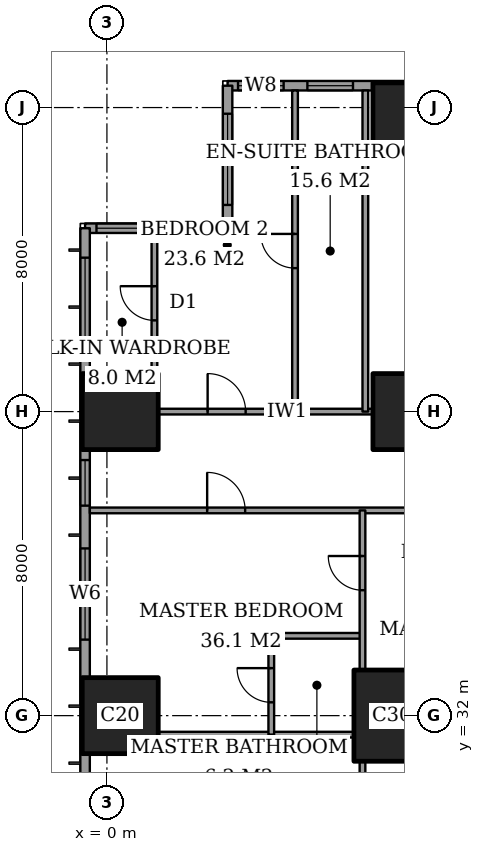
"""IFC4 building model, lengths in metres.
Left out: names, types, materials, properties, quantities, classifications, styles, units other than length and angle.
Written with IfcOpenShell. Run it as: python <this file> out.ifc"""

import sys

from ifc_helpers import new_model, si_unit, direction, frame, frame_2d, origin, origin_2d, place, context, subcontext, project, spatial, rectangle, extrude, element, fill, save


model = new_model("IFC4")
c1 = context("Model", 3, precision=1e-05, world=origin(), true_north=direction((0.0, 1.0)))
c2 = subcontext(c1, "Body", "Model", "MODEL_VIEW")
j1 = project(units=[si_unit("LENGTHUNIT", "METRE"), si_unit("PLANEANGLEUNIT", "RADIAN")], contexts=[c1])
p1 = place(None, origin())
s1 = spatial("IfcSite", under=j1, at=p1, CompositionType="ELEMENT")
p2 = place(p1, origin())
s2 = spatial("IfcBuilding", under=s1, at=p2, CompositionType="ELEMENT")
p3 = place(p2, frame((0.0, 0.0, 58.4)))
s3 = spatial("IfcBuildingStorey", under=s2, at=p3, CompositionType="ELEMENT", Elevation=58.4)
for number, where, z_axis, x_axis in (
    (1, (0.35, 32.0, 0.0), (0.0, 0.0, 1.0), (1.0, 0.0, 0.0)),
    (2, (0.35, 40.0, 0.0), (0.0, 0.0, 1.0), (1.0, 0.0, 0.0)),
):
    element("IfcColumn", number, at=place(p3, frame(where, z_axis=z_axis, x_axis=x_axis)), inside=s3, PredefinedType="COLUMN", context=c2, shape_type="SweptSolid", body=[
        extrude(rectangle(XDim=2.0, YDim=2.0, at=origin_2d()), origin(), (0.0, 0.0, 1.0), 3.6),
    ])
p4 = place(p3, frame((8.0, 32.0, 0.0), z_axis=(0.0, 0.0, 1.0), x_axis=(1.0, 0.0, 0.0)))
e3 = element("IfcColumn", 3, at=p4, inside=s3, PredefinedType="COLUMN", context=c2, shape_type="SweptSolid", body=[
    extrude(rectangle(XDim=3.0, YDim=2.4, at=origin_2d()), origin(), (0.0, 0.0, 1.0), 3.6),
])
for number, where, z_axis, x_axis in (
    (4, (8.0, 40.0, 0.0), (0.0, 0.0, 1.0), (1.0, 0.0, 0.0)),
    (5, (8.0, 47.65, 0.0), (0.0, 0.0, 1.0), (1.0, 0.0, 0.0)),
):
    element("IfcColumn", number, at=place(p3, frame(where, z_axis=z_axis, x_axis=x_axis)), inside=s3, PredefinedType="COLUMN", context=c2, shape_type="SweptSolid", body=[
        extrude(rectangle(XDim=2.0, YDim=2.0, at=origin_2d()), origin(), (0.0, 0.0, 1.0), 3.6),
    ])
p5 = place(p3, frame((24.575, 48.575, 0.0), z_axis=(0.0, 0.0, 1.0), x_axis=(-1.0, 0.0, 0.0)))
e6 = element("IfcWall", 6, at=p5, inside=s3, PredefinedType="SOLIDWALL", context=c2, shape_type="SweptSolid", body=[
    extrude(rectangle(XDim=21.4, YDim=0.25, at=frame_2d((10.7, 0.0))), origin(), (0.0, 0.0, 1.0), 3.6),
])
p6 = place(p5, frame((2.65, 0.0, 0.6)))
e7 = element("IfcOpeningElement", 7, at=p6, cuts=e6, PredefinedType="OPENING", context=c2, shape_type="SweptSolid", body=[
    extrude(rectangle(XDim=1.2, YDim=2.0, at=frame_2d((0.6, 1.0))), frame((0.0, 0.135, 0.0), z_axis=(0.0, -1.0, 0.0), x_axis=(1.0, 0.0, 0.0)), (0.0, 0.0, 1.0), 0.27),
])
p7 = place(p5, frame((5.475, 0.0, 0.6)))
e8 = element("IfcOpeningElement", 8, at=p7, cuts=e6, PredefinedType="OPENING", context=c2, shape_type="SweptSolid", body=[
    extrude(rectangle(XDim=1.2, YDim=2.0, at=frame_2d((0.6, 1.0))), frame((0.0, 0.135, 0.0), z_axis=(0.0, -1.0, 0.0), x_axis=(1.0, 0.0, 0.0)), (0.0, 0.0, 1.0), 0.27),
])
p8 = place(p5, frame((11.375, 0.0, 0.6)))
e9 = element("IfcOpeningElement", 9, at=p8, cuts=e6, PredefinedType="OPENING", context=c2, shape_type="SweptSolid", body=[
    extrude(rectangle(XDim=2.4, YDim=2.0, at=frame_2d((1.2, 1.0))), frame((0.0, 0.135, 0.0), z_axis=(0.0, -1.0, 0.0), x_axis=(1.0, 0.0, 0.0)), (0.0, 0.0, 1.0), 0.27),
])
p9 = place(p5, frame((18.1, 0.0, 0.6)))
e10 = element("IfcOpeningElement", 10, at=p9, cuts=e6, PredefinedType="OPENING", context=c2, shape_type="SweptSolid", body=[
    extrude(rectangle(XDim=1.2, YDim=2.0, at=frame_2d((0.6, 1.0))), frame((0.0, 0.135, 0.0), z_axis=(0.0, -1.0, 0.0), x_axis=(1.0, 0.0, 0.0)), (0.0, 0.0, 1.0), 0.27),
])
p10 = place(p5, frame((19.925, 0.0, 0.6)))
e11 = element("IfcOpeningElement", 11, at=p10, cuts=e6, PredefinedType="OPENING", context=c2, shape_type="SweptSolid", body=[
    extrude(rectangle(XDim=1.2, YDim=2.0, at=frame_2d((0.6, 1.0))), frame((0.0, 0.135, 0.0), z_axis=(0.0, -1.0, 0.0), x_axis=(1.0, 0.0, 0.0)), (0.0, 0.0, 1.0), 0.27),
])
p11 = place(p3, frame((3.175, 48.575, 0.0), z_axis=(0.0, 0.0, 1.0), x_axis=(0.0, -1.0, 0.0)))
e12 = element("IfcWall", 12, at=p11, inside=s3, PredefinedType="SOLIDWALL", context=c2, shape_type="SweptSolid", body=[
    extrude(rectangle(XDim=3.75, YDim=0.25, at=frame_2d((1.875, 0.0))), origin(), (0.0, 0.0, 1.0), 3.6),
])
p12 = place(p11, frame((0.738, 0.0, 0.6)))
e13 = element("IfcOpeningElement", 13, at=p12, cuts=e12, PredefinedType="OPENING", context=c2, shape_type="SweptSolid", body=[
    extrude(rectangle(XDim=2.4, YDim=2.0, at=frame_2d((1.2, 1.0))), frame((0.0, 0.135, 0.0), z_axis=(0.0, -1.0, 0.0), x_axis=(1.0, 0.0, 0.0)), (0.0, 0.0, 1.0), 0.27),
])
p13 = place(p3, frame((3.175, 44.825, 0.0), z_axis=(0.0, 0.0, 1.0), x_axis=(-1.0, 0.0, 0.0)))
e14 = element("IfcWall", 14, at=p13, inside=s3, PredefinedType="SOLIDWALL", context=c2, shape_type="SweptSolid", body=[
    extrude(rectangle(XDim=3.75, YDim=0.25, at=frame_2d((1.875, 0.0))), origin(), (0.0, 0.0, 1.0), 3.6),
])
p14 = place(p13, frame((0.363, 0.0, 0.6)))
e15 = element("IfcOpeningElement", 15, at=p14, cuts=e14, PredefinedType="OPENING", context=c2, shape_type="SweptSolid", body=[
    extrude(rectangle(XDim=1.2, YDim=2.0, at=frame_2d((0.6, 1.0))), frame((0.0, 0.135, 0.0), z_axis=(0.0, -1.0, 0.0), x_axis=(1.0, 0.0, 0.0)), (0.0, 0.0, 1.0), 0.27),
])
p15 = place(p13, frame((2.25, 0.0, 0.6)))
e16 = element("IfcOpeningElement", 16, at=p15, cuts=e14, PredefinedType="OPENING", context=c2, shape_type="SweptSolid", body=[
    extrude(rectangle(XDim=1.2, YDim=2.0, at=frame_2d((0.6, 1.0))), frame((0.0, 0.135, 0.0), z_axis=(0.0, -1.0, 0.0), x_axis=(1.0, 0.0, 0.0)), (0.0, 0.0, 1.0), 0.27),
])
p16 = place(p3, frame((-0.575, 44.825, 0.0), z_axis=(0.0, 0.0, 1.0), x_axis=(0.0, -1.0, 0.0)))
e17 = element("IfcWall", 17, at=p16, inside=s3, PredefinedType="SOLIDWALL", context=c2, shape_type="SweptSolid", body=[
    extrude(rectangle(XDim=41.65, YDim=0.25, at=frame_2d((20.825, 0.0))), origin(), (0.0, 0.0, 1.0), 3.6),
])
p17 = place(p16, frame((0.775, 0.0, 0.6)))
e18 = element("IfcOpeningElement", 18, at=p17, cuts=e17, PredefinedType="OPENING", context=c2, shape_type="SweptSolid", body=[
    extrude(rectangle(XDim=2.4, YDim=2.0, at=frame_2d((1.2, 1.0))), frame((0.0, 0.135, 0.0), z_axis=(0.0, -1.0, 0.0), x_axis=(1.0, 0.0, 0.0)), (0.0, 0.0, 1.0), 0.27),
])
p18 = place(p16, frame((6.1, 0.0, 0.6)))
e19 = element("IfcOpeningElement", 19, at=p18, cuts=e17, PredefinedType="OPENING", context=c2, shape_type="SweptSolid", body=[
    extrude(rectangle(XDim=1.2, YDim=2.0, at=frame_2d((0.6, 1.0))), frame((0.0, 0.135, 0.0), z_axis=(0.0, -1.0, 0.0), x_axis=(1.0, 0.0, 0.0)), (0.0, 0.0, 1.0), 0.27),
])
p19 = place(p16, frame((8.425, 0.0, 0.6)))
e20 = element("IfcOpeningElement", 20, at=p19, cuts=e17, PredefinedType="OPENING", context=c2, shape_type="SweptSolid", body=[
    extrude(rectangle(XDim=2.4, YDim=2.0, at=frame_2d((1.2, 1.0))), frame((0.0, 0.135, 0.0), z_axis=(0.0, -1.0, 0.0), x_axis=(1.0, 0.0, 0.0)), (0.0, 0.0, 1.0), 0.27),
])
p20 = place(p16, frame((15.625, 0.0, 0.6)))
e21 = element("IfcOpeningElement", 21, at=p20, cuts=e17, PredefinedType="OPENING", context=c2, shape_type="SweptSolid", body=[
    extrude(rectangle(XDim=2.4, YDim=2.0, at=frame_2d((1.2, 1.0))), frame((0.0, 0.135, 0.0), z_axis=(0.0, -1.0, 0.0), x_axis=(1.0, 0.0, 0.0)), (0.0, 0.0, 1.0), 0.27),
])
p21 = place(p16, frame((23.625, 0.0, 0.6)))
e22 = element("IfcOpeningElement", 22, at=p21, cuts=e17, PredefinedType="OPENING", context=c2, shape_type="SweptSolid", body=[
    extrude(rectangle(XDim=2.4, YDim=2.0, at=frame_2d((1.2, 1.0))), frame((0.0, 0.135, 0.0), z_axis=(0.0, -1.0, 0.0), x_axis=(1.0, 0.0, 0.0)), (0.0, 0.0, 1.0), 0.27),
])
p22 = place(p16, frame((30.825, 0.0, 0.6)))
e23 = element("IfcOpeningElement", 23, at=p22, cuts=e17, PredefinedType="OPENING", context=c2, shape_type="SweptSolid", body=[
    extrude(rectangle(XDim=2.4, YDim=2.0, at=frame_2d((1.2, 1.0))), frame((0.0, 0.135, 0.0), z_axis=(0.0, -1.0, 0.0), x_axis=(1.0, 0.0, 0.0)), (0.0, 0.0, 1.0), 0.27),
])
p23 = place(p16, frame((34.5, 0.0, 0.6)))
e24 = element("IfcOpeningElement", 24, at=p23, cuts=e17, PredefinedType="OPENING", context=c2, shape_type="SweptSolid", body=[
    extrude(rectangle(XDim=1.2, YDim=2.0, at=frame_2d((0.6, 1.0))), frame((0.0, 0.135, 0.0), z_axis=(0.0, -1.0, 0.0), x_axis=(1.0, 0.0, 0.0)), (0.0, 0.0, 1.0), 0.27),
])
p24 = place(p16, frame((38.475, 0.0, 0.6)))
e25 = element("IfcOpeningElement", 25, at=p24, cuts=e17, PredefinedType="OPENING", context=c2, shape_type="SweptSolid", body=[
    extrude(rectangle(XDim=2.4, YDim=2.0, at=frame_2d((1.2, 1.0))), frame((0.0, 0.135, 0.0), z_axis=(0.0, -1.0, 0.0), x_axis=(1.0, 0.0, 0.0)), (0.0, 0.0, 1.0), 0.27),
])
p25 = place(p3, frame((1.35, 31.5, 0.0), z_axis=(0.0, 0.0, 1.0), x_axis=(1.0, 0.0, 0.0)))
e26 = element("IfcWall", 26, at=p25, inside=s3, PredefinedType="PARTITIONING", context=c2, shape_type="SweptSolid", body=[
    extrude(rectangle(XDim=5.15, YDim=0.15, at=frame_2d((2.575, 0.0))), origin(), (0.0, 0.0, 1.0), 3.35),
])
p26 = place(p3, frame((4.325, 34.1, 0.0), z_axis=(0.0, 0.0, 1.0), x_axis=(1.0, 0.0, 0.0)))
e27 = element("IfcWall", 27, at=p26, inside=s3, PredefinedType="PARTITIONING", context=c2, shape_type="SweptSolid", body=[
    extrude(rectangle(XDim=2.4, YDim=0.15, at=frame_2d((1.2, 0.0))), origin(), (0.0, 0.0, 1.0), 3.35),
])
p27 = place(p3, frame((-0.45, 37.4, 0.0), z_axis=(0.0, 0.0, 1.0), x_axis=(1.0, 0.0, 0.0)))
e28 = element("IfcWall", 28, at=p27, inside=s3, PredefinedType="PARTITIONING", context=c2, shape_type="SweptSolid", body=[
    extrude(rectangle(XDim=25.011, YDim=0.15, at=frame_2d((12.505, 0.0))), origin(), (0.0, 0.0, 1.0), 3.35),
])
p28 = place(p27, frame((10.65, 0.0, 0.0)))
e29 = element("IfcOpeningElement", 29, at=p28, cuts=e28, PredefinedType="OPENING", context=c2, shape_type="SweptSolid", body=[
    extrude(rectangle(XDim=1.0, YDim=2.1, at=frame_2d((0.5, 1.05))), frame((0.0, 0.085, 0.0), z_axis=(0.0, -1.0, 0.0), x_axis=(1.0, 0.0, 0.0)), (0.0, 0.0, 1.0), 0.17),
])
p29 = place(p27, frame((3.087, 0.0, 0.0)))
e30 = element("IfcOpeningElement", 30, at=p29, cuts=e28, PredefinedType="OPENING", context=c2, shape_type="SweptSolid", body=[
    extrude(rectangle(XDim=1.0, YDim=2.1, at=frame_2d((0.5, 1.05))), frame((0.0, 0.085, 0.0), z_axis=(0.0, -1.0, 0.0), x_axis=(1.0, 0.0, 0.0)), (0.0, 0.0, 1.0), 0.17),
])
p30 = place(p27, frame((13.45, 0.0, 0.0)))
e31 = element("IfcOpeningElement", 31, at=p30, cuts=e28, PredefinedType="OPENING", context=c2, shape_type="SweptSolid", body=[
    extrude(rectangle(XDim=1.0, YDim=2.1, at=frame_2d((0.5, 1.05))), frame((0.0, 0.085, 0.0), z_axis=(0.0, -1.0, 0.0), x_axis=(1.0, 0.0, 0.0)), (0.0, 0.0, 1.0), 0.17),
])
p31 = place(p27, frame((16.55, 0.0, 0.0)))
e32 = element("IfcOpeningElement", 32, at=p31, cuts=e28, PredefinedType="OPENING", context=c2, shape_type="SweptSolid", body=[
    extrude(rectangle(XDim=1.0, YDim=2.1, at=frame_2d((0.5, 1.05))), frame((0.0, 0.085, 0.0), z_axis=(0.0, -1.0, 0.0), x_axis=(1.0, 0.0, 0.0)), (0.0, 0.0, 1.0), 0.17),
])
p32 = place(p27, frame((21.175, 0.0, 0.0)))
e33 = element("IfcOpeningElement", 33, at=p32, cuts=e28, PredefinedType="OPENING", context=c2, shape_type="SweptSolid", body=[
    extrude(rectangle(XDim=1.0, YDim=2.1, at=frame_2d((0.5, 1.05))), frame((0.0, 0.085, 0.0), z_axis=(0.0, -1.0, 0.0), x_axis=(1.0, 0.0, 0.0)), (0.0, 0.0, 1.0), 0.17),
])
p33 = place(p3, frame((1.35, 40.0, 0.0), z_axis=(0.0, 0.0, 1.0), x_axis=(1.0, 0.0, 0.0)))
e34 = element("IfcWall", 34, at=p33, inside=s3, PredefinedType="PARTITIONING", context=c2, shape_type="SweptSolid", body=[
    extrude(rectangle(XDim=5.65, YDim=0.15, at=frame_2d((2.825, 0.0))), origin(), (0.0, 0.0, 1.0), 3.35),
])
p34 = place(p33, frame((1.3, 0.0, 0.0)))
e35 = element("IfcOpeningElement", 35, at=p34, cuts=e34, PredefinedType="OPENING", context=c2, shape_type="SweptSolid", body=[
    extrude(rectangle(XDim=1.0, YDim=2.1, at=frame_2d((0.5, 1.05))), frame((0.0, 0.085, 0.0), z_axis=(0.0, -1.0, 0.0), x_axis=(1.0, 0.0, 0.0)), (0.0, 0.0, 1.0), 0.17),
])
p35 = place(p3, frame((1.25, 41.0, 0.0), z_axis=(0.0, 0.0, 1.0), x_axis=(0.0, 1.0, 0.0)))
e36 = element("IfcWall", 36, at=p35, inside=s3, PredefinedType="PARTITIONING", context=c2, shape_type="SweptSolid", body=[
    extrude(rectangle(XDim=3.7, YDim=0.15, at=frame_2d((1.85, 0.0))), origin(), (0.0, 0.0, 1.0), 3.35),
])
p36 = place(p35, frame((1.4, 0.0, 0.0)))
e37 = element("IfcOpeningElement", 37, at=p36, cuts=e36, PredefinedType="OPENING", context=c2, shape_type="SweptSolid", body=[
    extrude(rectangle(XDim=0.9, YDim=2.1, at=frame_2d((0.45, 1.05))), frame((0.0, 0.085, 0.0), z_axis=(0.0, -1.0, 0.0), x_axis=(1.0, 0.0, 0.0)), (0.0, 0.0, 1.0), 0.17),
])
p37 = place(p3, frame((4.325, 31.5, 0.0), z_axis=(0.0, 0.0, 1.0), x_axis=(0.0, 1.0, 0.0)))
e38 = element("IfcWall", 38, at=p37, inside=s3, PredefinedType="PARTITIONING", context=c2, shape_type="SweptSolid", body=[
    extrude(rectangle(XDim=2.6, YDim=0.15, at=frame_2d((1.3, 0.0))), origin(), (0.0, 0.0, 1.0), 3.35),
])
p38 = place(p37, frame((0.85, 0.0, 0.0)))
e39 = element("IfcOpeningElement", 39, at=p38, cuts=e38, PredefinedType="OPENING", context=c2, shape_type="SweptSolid", body=[
    extrude(rectangle(XDim=0.9, YDim=2.1, at=frame_2d((0.45, 1.05))), frame((0.0, 0.085, 0.0), z_axis=(0.0, -1.0, 0.0), x_axis=(1.0, 0.0, 0.0)), (0.0, 0.0, 1.0), 0.17),
])
p39 = place(p3, frame((4.95, 40.0, 0.0), z_axis=(0.0, 0.0, 1.0), x_axis=(0.0, 1.0, 0.0)))
e40 = element("IfcWall", 40, at=p39, inside=s3, PredefinedType="PARTITIONING", context=c2, shape_type="SweptSolid", body=[
    extrude(rectangle(XDim=8.45, YDim=0.15, at=frame_2d((4.225, 0.0))), origin(), (0.0, 0.0, 1.0), 3.35),
])
p40 = place(p39, frame((3.775, 0.0, 0.0)))
e41 = element("IfcOpeningElement", 41, at=p40, cuts=e40, PredefinedType="OPENING", context=c2, shape_type="SweptSolid", body=[
    extrude(rectangle(XDim=0.9, YDim=2.1, at=frame_2d((0.45, 1.05))), frame((0.0, 0.085, 0.0), z_axis=(0.0, -1.0, 0.0), x_axis=(1.0, 0.0, 0.0)), (0.0, 0.0, 1.0), 0.17),
])
p41 = place(p3, frame((6.725, 28.35, 0.0), z_axis=(0.0, 0.0, 1.0), x_axis=(0.0, 1.0, 0.0)))
e42 = element("IfcWall", 42, at=p41, inside=s3, PredefinedType="PARTITIONING", context=c2, shape_type="SweptSolid", body=[
    extrude(rectangle(XDim=2.45, YDim=0.15, at=frame_2d((1.225, 0.0))), origin(), (0.0, 0.0, 1.0), 3.35),
])
p42 = place(p41, frame((0.913, 0.0, 0.0)))
e43 = element("IfcOpeningElement", 43, at=p42, cuts=e42, PredefinedType="OPENING", context=c2, shape_type="SweptSolid", body=[
    extrude(rectangle(XDim=1.0, YDim=2.1, at=frame_2d((0.5, 1.05))), frame((0.0, 0.085, 0.0), z_axis=(0.0, -1.0, 0.0), x_axis=(1.0, 0.0, 0.0)), (0.0, 0.0, 1.0), 0.17),
])
p43 = place(p3, frame((6.725, 33.2, 0.0), z_axis=(0.0, 0.0, 1.0), x_axis=(0.0, 1.0, 0.0)))
e44 = element("IfcWall", 44, at=p43, inside=s3, PredefinedType="PARTITIONING", context=c2, shape_type="SweptSolid", body=[
    extrude(rectangle(XDim=4.2, YDim=0.15, at=frame_2d((2.1, 0.0))), origin(), (0.0, 0.0, 1.0), 3.35),
])
p44 = place(p43, frame((2.1, 0.0, 0.0)))
e45 = element("IfcOpeningElement", 45, at=p44, cuts=e44, PredefinedType="OPENING", context=c2, shape_type="SweptSolid", body=[
    extrude(rectangle(XDim=0.9, YDim=2.1, at=frame_2d((0.45, 1.05))), frame((0.0, 0.085, 0.0), z_axis=(0.0, -1.0, 0.0), x_axis=(1.0, 0.0, 0.0)), (0.0, 0.0, 1.0), 0.17),
])
p45 = place(p3, frame((6.8, 40.0, 0.0), z_axis=(0.0, 0.0, 1.0), x_axis=(0.0, 1.0, 0.0)))
e46 = element("IfcWall", 46, at=p45, inside=s3, PredefinedType="PARTITIONING", context=c2, shape_type="SweptSolid", body=[
    extrude(rectangle(XDim=8.45, YDim=0.15, at=frame_2d((4.225, 0.0))), origin(), (0.0, 0.0, 1.0), 3.35),
])
p46 = place(p9, origin())
e47 = element("IfcWindow", 47, at=p46, inside=s3, PartitioningType="SINGLE_PANEL", PredefinedType="WINDOW", context=c2, shape_type="SweptSolid", body=[
    extrude(rectangle(XDim=1.2, YDim=2.0, at=frame_2d((0.6, 1.0))), frame((0.0, 0.03, 0.0), z_axis=(0.0, -1.0, 0.0), x_axis=(1.0, 0.0, 0.0)), (0.0, 0.0, 1.0), 0.06),
])
fill(e10, e47)
p47 = place(p10, origin())
e48 = element("IfcWindow", 48, at=p47, inside=s3, PartitioningType="SINGLE_PANEL", PredefinedType="WINDOW", context=c2, shape_type="SweptSolid", body=[
    extrude(rectangle(XDim=1.2, YDim=2.0, at=frame_2d((0.6, 1.0))), frame((0.0, 0.03, 0.0), z_axis=(0.0, -1.0, 0.0), x_axis=(1.0, 0.0, 0.0)), (0.0, 0.0, 1.0), 0.06),
])
fill(e11, e48)
p48 = place(p12, origin())
e49 = element("IfcWindow", 49, at=p48, inside=s3, PartitioningType="SINGLE_PANEL", PredefinedType="WINDOW", context=c2, shape_type="SweptSolid", body=[
    extrude(rectangle(XDim=2.4, YDim=2.0, at=frame_2d((1.2, 1.0))), frame((0.0, 0.03, 0.0), z_axis=(0.0, -1.0, 0.0), x_axis=(1.0, 0.0, 0.0)), (0.0, 0.0, 1.0), 0.06),
])
fill(e13, e49)
p49 = place(p14, origin())
e50 = element("IfcWindow", 50, at=p49, inside=s3, PartitioningType="SINGLE_PANEL", PredefinedType="WINDOW", context=c2, shape_type="SweptSolid", body=[
    extrude(rectangle(XDim=1.2, YDim=2.0, at=frame_2d((0.6, 1.0))), frame((0.0, 0.03, 0.0), z_axis=(0.0, -1.0, 0.0), x_axis=(1.0, 0.0, 0.0)), (0.0, 0.0, 1.0), 0.06),
])
fill(e15, e50)
p50 = place(p15, origin())
e51 = element("IfcWindow", 51, at=p50, inside=s3, PartitioningType="SINGLE_PANEL", PredefinedType="WINDOW", context=c2, shape_type="SweptSolid", body=[
    extrude(rectangle(XDim=1.2, YDim=2.0, at=frame_2d((0.6, 1.0))), frame((0.0, 0.03, 0.0), z_axis=(0.0, -1.0, 0.0), x_axis=(1.0, 0.0, 0.0)), (0.0, 0.0, 1.0), 0.06),
])
fill(e16, e51)
p51 = place(p17, origin())
e52 = element("IfcWindow", 52, at=p51, inside=s3, PartitioningType="SINGLE_PANEL", PredefinedType="WINDOW", context=c2, shape_type="SweptSolid", body=[
    extrude(rectangle(XDim=2.4, YDim=2.0, at=frame_2d((1.2, 1.0))), frame((0.0, 0.03, 0.0), z_axis=(0.0, -1.0, 0.0), x_axis=(1.0, 0.0, 0.0)), (0.0, 0.0, 1.0), 0.06),
])
fill(e18, e52)
p52 = place(p18, origin())
e53 = element("IfcWindow", 53, at=p52, inside=s3, PartitioningType="SINGLE_PANEL", PredefinedType="WINDOW", context=c2, shape_type="SweptSolid", body=[
    extrude(rectangle(XDim=1.2, YDim=2.0, at=frame_2d((0.6, 1.0))), frame((0.0, 0.03, 0.0), z_axis=(0.0, -1.0, 0.0), x_axis=(1.0, 0.0, 0.0)), (0.0, 0.0, 1.0), 0.06),
])
fill(e19, e53)
p53 = place(p19, origin())
e54 = element("IfcWindow", 54, at=p53, inside=s3, PartitioningType="SINGLE_PANEL", PredefinedType="WINDOW", context=c2, shape_type="SweptSolid", body=[
    extrude(rectangle(XDim=2.4, YDim=2.0, at=frame_2d((1.2, 1.0))), frame((0.0, 0.03, 0.0), z_axis=(0.0, -1.0, 0.0), x_axis=(1.0, 0.0, 0.0)), (0.0, 0.0, 1.0), 0.06),
])
fill(e20, e54)
p54 = place(p36, origin())
e55 = element("IfcDoor", 55, at=p54, inside=s3, OperationType="SINGLE_SWING_LEFT", PredefinedType="DOOR", context=c2, shape_type="SweptSolid", body=[
    extrude(rectangle(XDim=0.9, YDim=2.1, at=frame_2d((0.45, 1.05))), frame((0.0, 0.025, 0.0), z_axis=(0.0, -1.0, 0.0), x_axis=(1.0, 0.0, 0.0)), (0.0, 0.0, 1.0), 0.05),
])
fill(e37, e55)
p55 = place(p34, origin())
e56 = element("IfcDoor", 56, at=p55, inside=s3, OperationType="SINGLE_SWING_RIGHT", PredefinedType="DOOR", context=c2, shape_type="SweptSolid", body=[
    extrude(rectangle(XDim=1.0, YDim=2.1, at=frame_2d((0.5, 1.05))), frame((0.0, 0.025, 0.0), z_axis=(0.0, -1.0, 0.0), x_axis=(1.0, 0.0, 0.0)), (0.0, 0.0, 1.0), 0.05),
])
fill(e35, e56)
p56 = place(p40, origin())
e57 = element("IfcDoor", 57, at=p56, inside=s3, OperationType="SINGLE_SWING_LEFT", PredefinedType="DOOR", context=c2, shape_type="SweptSolid", body=[
    extrude(rectangle(XDim=0.9, YDim=2.1, at=frame_2d((0.45, 1.05))), frame((0.0, 0.025, 0.0), z_axis=(0.0, -1.0, 0.0), x_axis=(1.0, 0.0, 0.0)), (0.0, 0.0, 1.0), 0.05),
])
fill(e41, e57)
p57 = place(p38, origin())
e58 = element("IfcDoor", 58, at=p57, inside=s3, OperationType="SINGLE_SWING_LEFT", PredefinedType="DOOR", context=c2, shape_type="SweptSolid", body=[
    extrude(rectangle(XDim=0.9, YDim=2.1, at=frame_2d((0.45, 1.05))), frame((0.0, 0.025, 0.0), z_axis=(0.0, -1.0, 0.0), x_axis=(1.0, 0.0, 0.0)), (0.0, 0.0, 1.0), 0.05),
])
fill(e39, e58)
p58 = place(p29, origin())
e59 = element("IfcDoor", 59, at=p58, inside=s3, OperationType="SINGLE_SWING_RIGHT", PredefinedType="DOOR", context=c2, shape_type="SweptSolid", body=[
    extrude(rectangle(XDim=1.0, YDim=2.1, at=frame_2d((0.5, 1.05))), frame((0.0, 0.025, 0.0), z_axis=(0.0, -1.0, 0.0), x_axis=(1.0, 0.0, 0.0)), (0.0, 0.0, 1.0), 0.05),
])
fill(e30, e59)
p59 = place(p44, origin())
e60 = element("IfcDoor", 60, at=p59, inside=s3, OperationType="SINGLE_SWING_LEFT", PredefinedType="DOOR", context=c2, shape_type="SweptSolid", body=[
    extrude(rectangle(XDim=0.9, YDim=2.1, at=frame_2d((0.45, 1.05))), frame((0.0, 0.025, 0.0), z_axis=(0.0, -1.0, 0.0), x_axis=(1.0, 0.0, 0.0)), (0.0, 0.0, 1.0), 0.05),
])
fill(e45, e60)
save(model, sys.argv[1])
